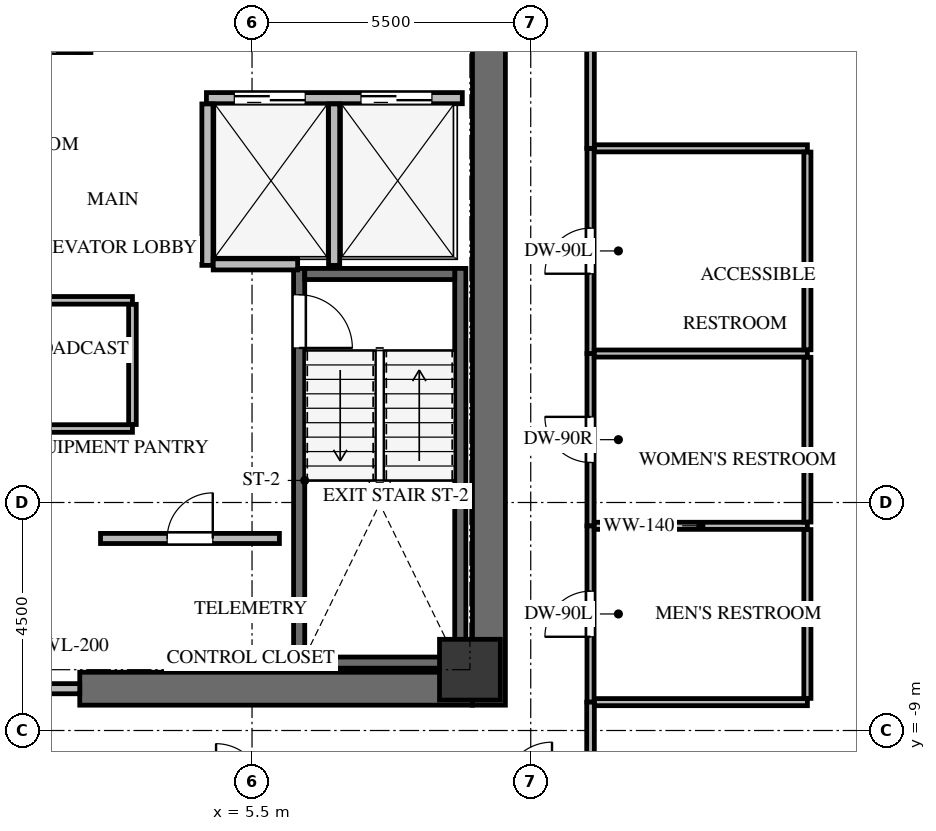
"""IFC4 building model, lengths in metres.
Left out: names, types, materials, properties, quantities, classifications, styles, units other than length and angle.
Written with IfcOpenShell. Run it as: python <this file> out.ifc"""

import sys

from ifc_helpers import new_model, si_unit, direction, frame, frame_2d, origin, origin_2d, place, context, subcontext, project, spatial, rectangle, extrude, source, transform, mapped, element, fill, save


model = new_model("IFC4")
c1 = context("Model", 3, precision=1e-05, world=origin(), true_north=direction((0.0, 1.0)))
c2 = subcontext(c1, "Body", "Model", "MODEL_VIEW")
j1 = project(units=[si_unit("LENGTHUNIT", "METRE"), si_unit("PLANEANGLEUNIT", "RADIAN")], contexts=[c1])
p1 = place(None, origin())
s1 = spatial("IfcSite", under=j1, at=p1, CompositionType="ELEMENT")
p2 = place(p1, origin())
s2 = spatial("IfcBuilding", under=s1, at=p2, CompositionType="ELEMENT")
p3 = place(p2, frame((0.0, 0.0, 190.3)))
s3 = spatial("IfcBuildingStorey", under=s2, at=p3, CompositionType="ELEMENT", Elevation=190.3)
p4 = place(p3, frame((10.175, -8.5, 0.0), z_axis=(0.0, 0.0, 1.0), x_axis=(0.0, 1.0, 0.0)))
e1 = element("IfcWall", 1, at=p4, inside=s3, PredefinedType="SHEAR", context=c2, shape_type="SweptSolid", body=[
    extrude(rectangle(XDim=17.0, YDim=0.65, at=frame_2d((8.5, 0.0))), origin(), (0.0, 0.0, 1.0), 3.3),
])
p5 = place(p3, frame((2.1, -8.175, 0.0), z_axis=(0.0, 0.0, 1.0), x_axis=(1.0, 0.0, 0.0)))
e2 = element("IfcWall", 2, at=p5, inside=s3, PredefinedType="SHEAR", context=c2, shape_type="SweptSolid", body=[
    extrude(rectangle(XDim=7.75, YDim=0.65, at=frame_2d((3.875, 0.0))), origin(), (0.0, 0.0, 1.0), 3.3),
])
p6 = place(p3, frame((9.61, -7.77, -0.24), z_axis=(0.0, 0.0, 1.0), x_axis=(0.0, 1.0, 0.0)))
e3 = element("IfcWall", 3, at=p6, inside=s3, PredefinedType="SHEAR", context=c2, shape_type="SweptSolid", body=[
    extrude(rectangle(XDim=7.89, YDim=0.22, at=frame_2d((3.945, 0.0))), origin(), (0.0, 0.0, 1.0), 3.3),
])
p7 = place(p3, frame((6.43, 0.12, -0.24), z_axis=(0.0, 0.0, 1.0), x_axis=(0.0, -1.0, 0.0)))
e4 = element("IfcWall", 4, at=p7, inside=s3, PredefinedType="SHEAR", context=c2, shape_type="SweptSolid", body=[
    extrude(rectangle(XDim=7.89, YDim=0.22, at=frame_2d((3.945, 0.0))), origin(), (0.0, 0.0, 1.0), 3.3),
])
p8 = place(p7, frame((0.52, 0.0, 0.0)))
e5 = element("IfcOpeningElement", 5, at=p8, cuts=e4, PredefinedType="OPENING", context=c2, shape_type="SweptSolid", body=[
    extrude(rectangle(XDim=1.05, YDim=2.15, at=frame_2d((0.525, 1.075))), frame((0.0, 0.12, 0.0), z_axis=(0.0, -1.0, 0.0), x_axis=(1.0, 0.0, 0.0)), (0.0, 0.0, 1.0), 0.24),
])
for number, where, z_axis, x_axis in (
    (6, (6.54, -7.66, -0.24), (0.0, 0.0, 1.0), (1.0, 0.0, 0.0)),
    (7, (9.5, 0.01, -0.24), (0.0, 0.0, 1.0), (-1.0, 0.0, 0.0)),
):
    element("IfcWall", number, at=place(p3, frame(where, z_axis=z_axis, x_axis=x_axis)), inside=s3, PredefinedType="SHEAR", context=c2, shape_type="SweptSolid", body=[
        extrude(rectangle(XDim=2.96, YDim=0.22, at=frame_2d((1.48, 0.0))), origin(), (0.0, 0.0, 1.0), 3.3),
    ])
p9 = place(p3, frame((2.21, 4.38, -0.24), z_axis=(0.0, 0.0, 1.0), x_axis=(0.0, 1.0, 0.0)))
e8 = element("IfcWall", 8, at=p9, inside=s3, PredefinedType="SHEAR", context=c2, shape_type="SweptSolid", body=[
    extrude(rectangle(XDim=3.4, YDim=0.22, at=frame_2d((1.7, 0.0))), origin(), (0.0, 0.0, 1.0), 3.3),
])
p10 = place(p3, frame((-5.25, 4.49, -0.24), z_axis=(0.0, 0.0, 1.0), x_axis=(1.0, 0.0, 0.0)))
e9 = element("IfcWall", 9, at=p10, inside=s3, PredefinedType="SHEAR", context=c2, shape_type="SweptSolid", body=[
    extrude(rectangle(XDim=7.35, YDim=0.22, at=frame_2d((3.675, 0.0))), origin(), (0.0, 0.0, 1.0), 3.3),
])
p11 = place(p10, frame((5.85, 0.0, 0.0)))
e10 = element("IfcOpeningElement", 10, at=p11, cuts=e9, PredefinedType="OPENING", context=c2, shape_type="SweptSolid", body=[
    extrude(rectangle(XDim=1.05, YDim=2.15, at=frame_2d((0.525, 1.075))), frame((0.0, 0.12, 0.0), z_axis=(0.0, -1.0, 0.0), x_axis=(1.0, 0.0, 0.0)), (0.0, 0.0, 1.0), 0.24),
])
m1 = source(origin(), c2, "Body", "SweptSolid", [
    extrude(rectangle(XDim=1.2, YDim=1.2, at=origin_2d()), origin(), (0.0, 0.0, 1.0), 3.3),
])
p12 = place(p3, frame((9.8, -7.8, -0.24), z_axis=(0.0, 0.0, 1.0), x_axis=(1.0, 0.0, 0.0)))
e11 = element("IfcColumn", 11, at=p12, inside=s3, PredefinedType="COLUMN", context=c2, shape_type="MappedRepresentation", body=[
    mapped(m1, transform((0.0, 0.0, 0.0), x_axis=(1.0, 0.0, 0.0), y_axis=(0.0, 1.0, 0.0), z_axis=(0.0, 0.0, 1.0), scale=1.0)),
])
p13 = place(p3, frame((-2.1, -8.175, 0.0), z_axis=(0.0, 0.0, 1.0), x_axis=(1.0, 0.0, 0.0)))
e12 = element("IfcWall", 12, at=p13, inside=s3, PredefinedType="SOLIDWALL", context=c2, shape_type="SweptSolid", body=[
    extrude(rectangle(XDim=4.2, YDim=0.2, at=frame_2d((2.1, 0.0))), origin(), (0.0, 0.0, 1.0), 3.045),
])
p14 = place(p13, frame((1.2, 0.0, 0.0)))
e13 = element("IfcOpeningElement", 13, at=p14, cuts=e12, PredefinedType="OPENING", context=c2, shape_type="SweptSolid", body=[
    extrude(rectangle(XDim=1.8, YDim=2.15, at=frame_2d((0.9, 1.075))), frame((0.0, 0.11, 0.0), z_axis=(0.0, -1.0, 0.0), x_axis=(1.0, 0.0, 0.0)), (0.0, 0.0, 1.0), 0.22),
])
p15 = place(p3, frame((4.6, 3.48, 0.0), z_axis=(0.0, 0.0, 1.0), x_axis=(1.0, 0.0, 0.0)))
e14 = element("IfcWall", 14, at=p15, inside=s3, PredefinedType="SOLIDWALL", context=c2, shape_type="SweptSolid", body=[
    extrude(rectangle(XDim=5.05, YDim=0.22, at=frame_2d((2.525, 0.0))), origin(), (0.0, 0.0, 1.0), 3.045),
])
p16 = place(p15, frame((0.55, 0.0, 0.0)))
e15 = element("IfcOpeningElement", 15, at=p16, cuts=e14, PredefinedType="OPENING", context=c2, shape_type="SweptSolid", body=[
    extrude(rectangle(XDim=1.4, YDim=2.15, at=frame_2d((0.7, 1.075))), frame((0.0, 0.12, 0.0), z_axis=(0.0, -1.0, 0.0), x_axis=(1.0, 0.0, 0.0)), (0.0, 0.0, 1.0), 0.24),
])
p17 = place(p15, frame((3.05, 0.0, 0.0)))
e16 = element("IfcOpeningElement", 16, at=p17, cuts=e14, PredefinedType="OPENING", context=c2, shape_type="SweptSolid", body=[
    extrude(rectangle(XDim=1.4, YDim=2.15, at=frame_2d((0.7, 1.075))), frame((0.0, 0.12, 0.0), z_axis=(0.0, -1.0, 0.0), x_axis=(1.0, 0.0, 0.0)), (0.0, 0.0, 1.0), 0.24),
])
for number, where, z_axis, x_axis in (
    (17, (4.62, 0.18, 0.0), (0.0, 0.0, 1.0), (0.0, 1.0, 0.0)),
    (18, (7.12, 0.18, 0.0), (0.0, 0.0, 1.0), (0.0, 1.0, 0.0)),
):
    element("IfcWall", number, at=place(p3, frame(where, z_axis=z_axis, x_axis=x_axis)), inside=s3, PredefinedType="SOLIDWALL", context=c2, shape_type="SweptSolid", body=[
        extrude(rectangle(XDim=3.186, YDim=0.22, at=frame_2d((1.593, 0.0))), origin(), (0.0, 0.0, 1.0), 3.045),
    ])
p18 = place(p3, frame((4.734, 0.2, 0.0), z_axis=(0.0, 0.0, 1.0), x_axis=(1.0, 0.0, 0.0)))
e19 = element("IfcWall", 19, at=p18, inside=s3, PredefinedType="SOLIDWALL", context=c2, shape_type="SweptSolid", body=[
    extrude(rectangle(XDim=1.666, YDim=0.22, at=frame_2d((0.833, 0.0))), origin(), (0.0, 0.0, 1.0), 3.045),
])
p19 = place(p3, frame((2.51, -5.21, 0.0), z_axis=(0.0, 0.0, 1.0), x_axis=(1.0, 0.0, 0.0)))
e20 = element("IfcWall", 20, at=p19, inside=s3, PredefinedType="SOLIDWALL", context=c2, shape_type="SweptSolid", body=[
    extrude(rectangle(XDim=3.53, YDim=0.2, at=frame_2d((1.765, 0.0))), origin(), (0.0, 0.0, 1.0), 3.045),
])
p20 = place(p19, frame((1.315, 0.0, 0.0)))
e21 = element("IfcOpeningElement", 21, at=p20, cuts=e20, PredefinedType="OPENING", context=c2, shape_type="SweptSolid", body=[
    extrude(rectangle(XDim=0.9, YDim=2.05, at=frame_2d((0.45, 1.025))), frame((0.0, 0.11, 0.0), z_axis=(0.0, -1.0, 0.0), x_axis=(1.0, 0.0, 0.0)), (0.0, 0.0, 1.0), 0.22),
])
p21 = place(p3, frame((3.14, -3.04, 0.0), z_axis=(0.0, 0.0, 1.0), x_axis=(-1.0, 0.0, 0.0)))
e22 = element("IfcWall", 22, at=p21, inside=s3, PredefinedType="PARTITIONING", context=c2, shape_type="SweptSolid", body=[
    extrude(rectangle(XDim=7.48, YDim=0.15, at=frame_2d((3.74, 0.0))), origin(), (0.0, 0.0, 1.0), 3.045),
])
p22 = place(p21, frame((3.29, 0.0, 0.0)))
e23 = element("IfcOpeningElement", 23, at=p22, cuts=e22, PredefinedType="OPENING", context=c2, shape_type="SweptSolid", body=[
    extrude(rectangle(XDim=0.9, YDim=2.05, at=frame_2d((0.45, 1.025))), frame((0.0, 0.085, 0.0), z_axis=(0.0, -1.0, 0.0), x_axis=(1.0, 0.0, 0.0)), (0.0, 0.0, 1.0), 0.17),
])
p23 = place(p3, frame((-4.34, -0.51, 0.0), z_axis=(0.0, 0.0, 1.0), x_axis=(1.0, 0.0, 0.0)))
e24 = element("IfcWall", 24, at=p23, inside=s3, PredefinedType="PARTITIONING", context=c2, shape_type="SweptSolid", body=[
    extrude(rectangle(XDim=7.48, YDim=0.15, at=frame_2d((3.74, 0.0))), origin(), (0.0, 0.0, 1.0), 3.045),
])
p24 = place(p3, frame((3.14, -0.589, 0.0), z_axis=(0.0, 0.0, 1.0), x_axis=(0.0, -1.0, 0.0)))
e25 = element("IfcWall", 25, at=p24, inside=s3, PredefinedType="PARTITIONING", context=c2, shape_type="SweptSolid", body=[
    extrude(rectangle(XDim=2.372, YDim=0.15, at=frame_2d((1.186, 0.0))), origin(), (0.0, 0.0, 1.0), 3.045),
])
p25 = place(p3, frame((12.18, -8.44, 0.0), z_axis=(0.0, 0.0, 1.0), x_axis=(0.0, 1.0, 0.0)))
e26 = element("IfcWall", 26, at=p25, inside=s3, PredefinedType="PARTITIONING", context=c2, shape_type="SweptSolid", body=[
    extrude(rectangle(XDim=3.48, YDim=0.14, at=frame_2d((1.74, 0.0))), origin(), (0.0, 0.0, 1.0), 3.045),
])
p26 = place(p25, frame((1.29, 0.0, 0.0)))
e27 = element("IfcOpeningElement", 27, at=p26, cuts=e26, PredefinedType="OPENING", context=c2, shape_type="SweptSolid", body=[
    extrude(rectangle(XDim=0.9, YDim=2.05, at=frame_2d((0.45, 1.025))), frame((0.0, 0.08, 0.0), z_axis=(0.0, -1.0, 0.0), x_axis=(1.0, 0.0, 0.0)), (0.0, 0.0, 1.0), 0.16),
])
p27 = place(p3, frame((12.18, -4.96, 0.0), z_axis=(0.0, 0.0, 1.0), x_axis=(0.0, 1.0, 0.0)))
e28 = element("IfcWall", 28, at=p27, inside=s3, PredefinedType="PARTITIONING", context=c2, shape_type="SweptSolid", body=[
    extrude(rectangle(XDim=3.4, YDim=0.14, at=frame_2d((1.7, 0.0))), origin(), (0.0, 0.0, 1.0), 3.045),
])
p28 = place(p27, frame((1.25, 0.0, 0.0)))
e29 = element("IfcOpeningElement", 29, at=p28, cuts=e28, PredefinedType="OPENING", context=c2, shape_type="SweptSolid", body=[
    extrude(rectangle(XDim=0.9, YDim=2.05, at=frame_2d((0.45, 1.025))), frame((0.0, 0.08, 0.0), z_axis=(0.0, -1.0, 0.0), x_axis=(1.0, 0.0, 0.0)), (0.0, 0.0, 1.0), 0.16),
])
p29 = place(p3, frame((12.18, -1.56, 0.0), z_axis=(0.0, 0.0, 1.0), x_axis=(0.0, 1.0, 0.0)))
e30 = element("IfcWall", 30, at=p29, inside=s3, PredefinedType="PARTITIONING", context=c2, shape_type="SweptSolid", body=[
    extrude(rectangle(XDim=4.05, YDim=0.14, at=frame_2d((2.025, 0.0))), origin(), (0.0, 0.0, 1.0), 2.242),
])
p30 = place(p29, frame((1.575, 0.0, 0.0)))
e31 = element("IfcOpeningElement", 31, at=p30, cuts=e30, PredefinedType="OPENING", context=c2, shape_type="SweptSolid", body=[
    extrude(rectangle(XDim=0.9, YDim=2.05, at=frame_2d((0.45, 1.025))), frame((0.0, 0.08, 0.0), z_axis=(0.0, -1.0, 0.0), x_axis=(1.0, 0.0, 0.0)), (0.0, 0.0, 1.0), 0.16),
])
p31 = place(p3, frame((12.18, 2.49, 0.0), z_axis=(0.0, 0.0, 1.0), x_axis=(0.0, 1.0, 0.0)))
e32 = element("IfcWall", 32, at=p31, inside=s3, PredefinedType="PARTITIONING", context=c2, shape_type="SweptSolid", body=[
    extrude(rectangle(XDim=7.611, YDim=0.15, at=frame_2d((3.806, 0.0))), origin(), (0.0, 0.0, 1.0), 3.045),
])
p32 = place(p31, frame((3.345, 0.0, 0.0)))
e33 = element("IfcOpeningElement", 33, at=p32, cuts=e32, PredefinedType="OPENING", context=c2, shape_type="SweptSolid", body=[
    extrude(rectangle(XDim=0.92, YDim=2.1, at=frame_2d((0.46, 1.05))), frame((0.0, 0.085, 0.0), z_axis=(0.0, -1.0, 0.0), x_axis=(1.0, 0.0, 0.0)), (0.0, 0.0, 1.0), 0.17),
])
p33 = place(p3, frame((12.18, -10.101, 0.0), z_axis=(0.0, 0.0, 1.0), x_axis=(0.0, 1.0, 0.0)))
e34 = element("IfcWall", 34, at=p33, inside=s3, PredefinedType="PARTITIONING", context=c2, shape_type="SweptSolid", body=[
    extrude(rectangle(XDim=1.661, YDim=0.15, at=frame_2d((0.831, 0.0))), origin(), (0.0, 0.0, 1.0), 3.045),
])
p34 = place(p3, frame((12.254, -4.96, 0.0), z_axis=(0.0, 0.0, 1.0), x_axis=(1.0, 0.0, 0.0)))
e35 = element("IfcWall", 35, at=p34, inside=s3, PredefinedType="PARTITIONING", context=c2, shape_type="SweptSolid", body=[
    extrude(rectangle(XDim=4.206, YDim=0.14, at=frame_2d((2.103, 0.0))), origin(), (0.0, 0.0, 1.0), 3.045),
])
p35 = place(p3, frame((16.46, -8.44, 0.0), z_axis=(0.0, 0.0, 1.0), x_axis=(-1.0, 0.0, 0.0)))
e36 = element("IfcWall", 36, at=p35, inside=s3, PredefinedType="PARTITIONING", context=c2, shape_type="SweptSolid", body=[
    extrude(rectangle(XDim=4.201, YDim=0.14, at=frame_2d((2.101, 0.0))), origin(), (0.0, 0.0, 1.0), 3.045),
])
p36 = place(p3, frame((16.46, -5.034, 0.0), z_axis=(0.0, 0.0, 1.0), x_axis=(0.0, -1.0, 0.0)))
e37 = element("IfcWall", 37, at=p36, inside=s3, PredefinedType="PARTITIONING", context=c2, shape_type="SweptSolid", body=[
    extrude(rectangle(XDim=3.332, YDim=0.14, at=frame_2d((1.666, 0.0))), origin(), (0.0, 0.0, 1.0), 3.045),
])
p37 = place(p3, frame((12.254, -1.56, 0.0), z_axis=(0.0, 0.0, 1.0), x_axis=(1.0, 0.0, 0.0)))
e38 = element("IfcWall", 38, at=p37, inside=s3, PredefinedType="PARTITIONING", context=c2, shape_type="SweptSolid", body=[
    extrude(rectangle(XDim=4.206, YDim=0.14, at=frame_2d((2.103, 0.0))), origin(), (0.0, 0.0, 1.0), 3.045),
])
p38 = place(p3, frame((16.46, -1.634, 0.0), z_axis=(0.0, 0.0, 1.0), x_axis=(0.0, -1.0, 0.0)))
e39 = element("IfcWall", 39, at=p38, inside=s3, PredefinedType="PARTITIONING", context=c2, shape_type="SweptSolid", body=[
    extrude(rectangle(XDim=3.252, YDim=0.14, at=frame_2d((1.626, 0.0))), origin(), (0.0, 0.0, 1.0), 3.045),
])
p39 = place(p3, frame((12.259, 2.49, 0.0), z_axis=(0.0, 0.0, 1.0), x_axis=(1.0, 0.0, 0.0)))
e40 = element("IfcWall", 40, at=p39, inside=s3, PredefinedType="PARTITIONING", context=c2, shape_type="SweptSolid", body=[
    extrude(rectangle(XDim=4.201, YDim=0.14, at=frame_2d((2.101, 0.0))), origin(), (0.0, 0.0, 1.0), 3.045),
])
p40 = place(p3, frame((16.46, 2.416, 0.0), z_axis=(0.0, 0.0, 1.0), x_axis=(0.0, -1.0, 0.0)))
e41 = element("IfcWall", 41, at=p40, inside=s3, PredefinedType="PARTITIONING", context=c2, shape_type="SweptSolid", body=[
    extrude(rectangle(XDim=3.902, YDim=0.14, at=frame_2d((1.951, 0.0))), origin(), (0.0, 0.0, 1.0), 2.242),
])
m2 = source(origin(), c2, "Body", "SweptSolid", [
    extrude(rectangle(XDim=1.05, YDim=2.15, at=frame_2d((0.525, 1.075))), frame((0.0, 0.025, 0.0), z_axis=(0.0, -1.0, 0.0), x_axis=(1.0, 0.0, 0.0)), (0.0, 0.0, 1.0), 0.05),
])
p41 = place(p8, origin())
e42 = element("IfcDoor", 42, at=p41, inside=s3, OperationType="SINGLE_SWING_RIGHT", PredefinedType="DOOR", context=c2, shape_type="MappedRepresentation", body=[
    mapped(m2, transform((0.0, 0.0, 0.0), x_axis=(1.0, 0.0, 0.0), y_axis=(0.0, 1.0, 0.0), z_axis=(0.0, 0.0, 1.0), scale=1.0)),
])
fill(e5, e42)
m3 = source(origin(), c2, "Body", "SweptSolid", [
    extrude(rectangle(XDim=1.4, YDim=2.15, at=frame_2d((0.7, 1.075))), frame((0.0, 0.025, 0.0), z_axis=(0.0, -1.0, 0.0), x_axis=(1.0, 0.0, 0.0)), (0.0, 0.0, 1.0), 0.05),
])
p42 = place(p16, origin())
e43 = element("IfcDoor", 43, at=p42, inside=s3, OperationType="DOUBLE_DOOR_SLIDING", PredefinedType="DOOR", context=c2, shape_type="MappedRepresentation", body=[
    mapped(m3, transform((0.0, 0.0, 0.0), x_axis=(1.0, 0.0, 0.0), y_axis=(0.0, 1.0, 0.0), z_axis=(0.0, 0.0, 1.0), scale=1.0)),
])
fill(e15, e43)
p43 = place(p17, origin())
e44 = element("IfcDoor", 44, at=p43, inside=s3, OperationType="DOUBLE_DOOR_SLIDING", PredefinedType="DOOR", context=c2, shape_type="MappedRepresentation", body=[
    mapped(m3, transform((0.0, 0.0, 0.0), x_axis=(1.0, 0.0, 0.0), y_axis=(0.0, 1.0, 0.0), z_axis=(0.0, 0.0, 1.0), scale=1.0)),
])
fill(e16, e44)
m4 = source(origin(), c2, "Body", "SweptSolid", [
    extrude(rectangle(XDim=0.9, YDim=2.05, at=frame_2d((0.45, 1.025))), frame((0.0, 0.025, 0.0), z_axis=(0.0, -1.0, 0.0), x_axis=(1.0, 0.0, 0.0)), (0.0, 0.0, 1.0), 0.05),
])
p44 = place(p20, origin())
e45 = element("IfcDoor", 45, at=p44, inside=s3, OperationType="SINGLE_SWING_RIGHT", PredefinedType="DOOR", context=c2, shape_type="MappedRepresentation", body=[
    mapped(m4, transform((0.0, 0.0, 0.0), x_axis=(1.0, 0.0, 0.0), y_axis=(0.0, 1.0, 0.0), z_axis=(0.0, 0.0, 1.0), scale=1.0)),
])
fill(e21, e45)
m5 = source(origin(), c2, "Body", "SweptSolid", [
    extrude(rectangle(XDim=0.9, YDim=2.05, at=frame_2d((0.45, 1.025))), frame((0.0, 0.025, 0.0), z_axis=(0.0, -1.0, 0.0), x_axis=(1.0, 0.0, 0.0)), (0.0, 0.0, 1.0), 0.05),
])
p45 = place(p26, origin())
e46 = element("IfcDoor", 46, at=p45, inside=s3, OperationType="SINGLE_SWING_LEFT", PredefinedType="DOOR", context=c2, shape_type="MappedRepresentation", body=[
    mapped(m5, transform((0.0, 0.0, 0.0), x_axis=(1.0, 0.0, 0.0), y_axis=(0.0, 1.0, 0.0), z_axis=(0.0, 0.0, 1.0), scale=1.0)),
])
fill(e27, e46)
m6 = source(origin(), c2, "Body", "SweptSolid", [
    extrude(rectangle(XDim=0.9, YDim=2.05, at=frame_2d((0.45, 1.025))), frame((0.0, 0.025, 0.0), z_axis=(0.0, -1.0, 0.0), x_axis=(1.0, 0.0, 0.0)), (0.0, 0.0, 1.0), 0.05),
])
p46 = place(p28, origin())
e47 = element("IfcDoor", 47, at=p46, inside=s3, OperationType="SINGLE_SWING_RIGHT", PredefinedType="DOOR", context=c2, shape_type="MappedRepresentation", body=[
    mapped(m6, transform((0.0, 0.0, 0.0), x_axis=(1.0, 0.0, 0.0), y_axis=(0.0, 1.0, 0.0), z_axis=(0.0, 0.0, 1.0), scale=1.0)),
])
fill(e29, e47)
p47 = place(p30, origin())
e48 = element("IfcDoor", 48, at=p47, inside=s3, OperationType="SINGLE_SWING_LEFT", PredefinedType="DOOR", context=c2, shape_type="MappedRepresentation", body=[
    mapped(m5, transform((0.0, 0.0, 0.0), x_axis=(1.0, 0.0, 0.0), y_axis=(0.0, 1.0, 0.0), z_axis=(0.0, 0.0, 1.0), scale=1.0)),
])
fill(e31, e48)
save(model, sys.argv[1])
